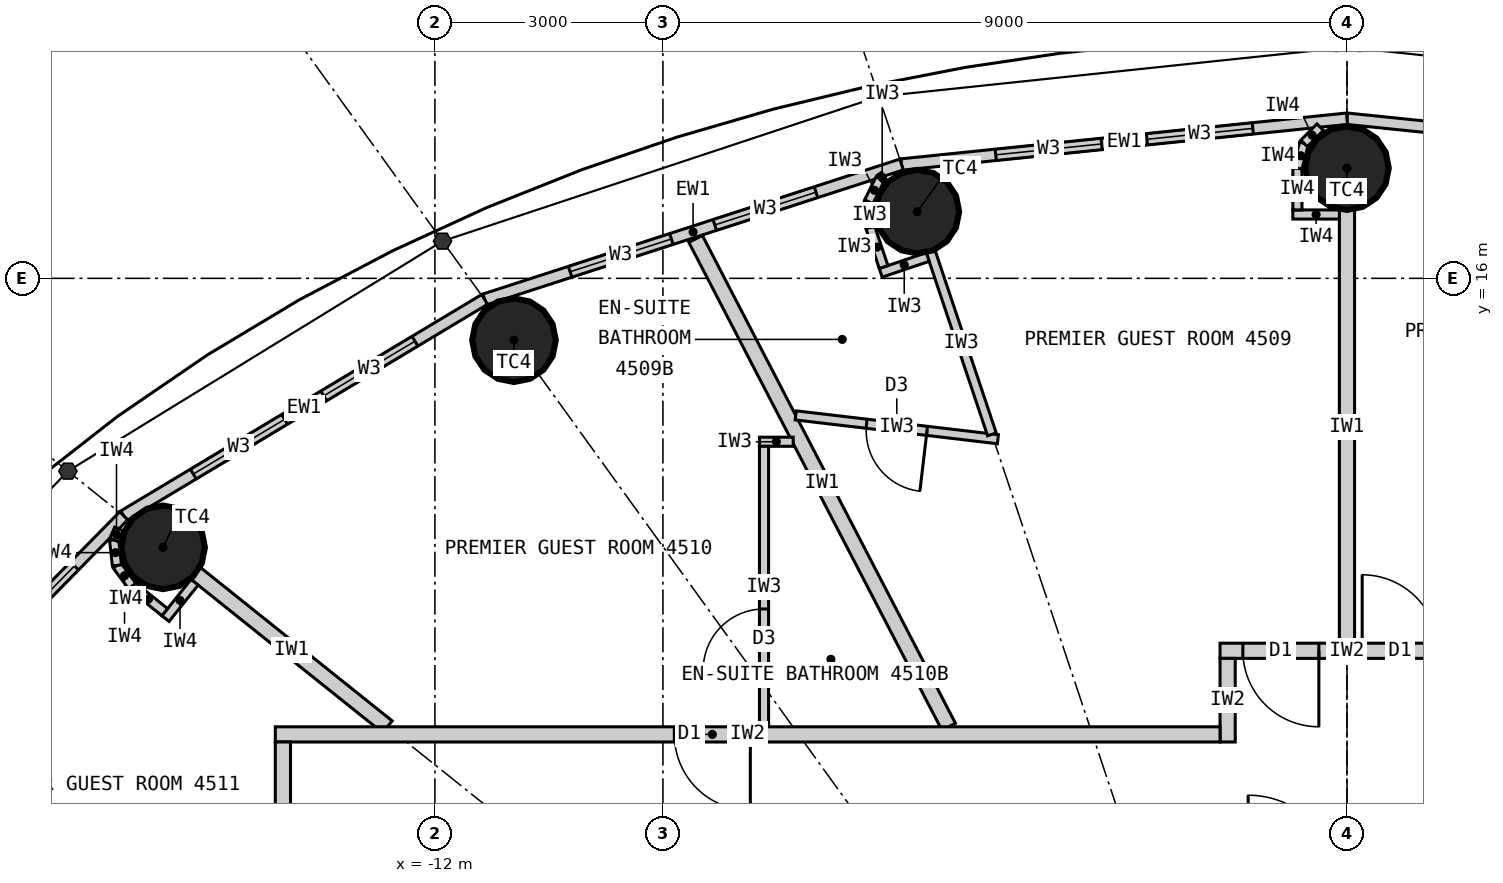
"""IFC4 building model, lengths in metres.
Left out: names, types, materials, properties, quantities, classifications, styles, units other than length and angle.
Written with IfcOpenShell. Run it as: python <this file> out.ifc"""

import sys

from ifc_helpers import new_model, si_unit, direction, frame, frame_2d, origin, origin_2d, place, context, subcontext, project, spatial, rectangle, circle, extrude, element, fill, save


model = new_model("IFC4")
c1 = context("Model", 3, precision=1e-05, world=origin(), true_north=direction((0.0, 1.0)))
c2 = subcontext(c1, "Body", "Model", "MODEL_VIEW")
j1 = project(units=[si_unit("LENGTHUNIT", "METRE"), si_unit("PLANEANGLEUNIT", "RADIAN")], contexts=[c1])
p1 = place(None, origin())
s1 = spatial("IfcSite", under=j1, at=p1, CompositionType="ELEMENT")
p2 = place(p1, origin())
s2 = spatial("IfcBuilding", under=s1, at=p2, CompositionType="ELEMENT")
p3 = place(p2, frame((0.0, 0.0, 169.8)))
s3 = spatial("IfcBuildingStorey", under=s2, at=p3, CompositionType="ELEMENT", Elevation=169.8)
for number, where, z_axis, x_axis in (
    (1, (0.0, 17.45, 0.0), (0.0, 0.0, 1.0), (1.0, 0.0, 0.0)),
    (2, (-5.653, 16.877, 0.0), (0.0, 0.0, 1.0), (1.0, 0.0, 0.0)),
    (3, (-10.96, 15.186, 0.0), (0.0, 0.0, 1.0), (1.0, 0.0, 0.0)),
    (4, (-15.576, 12.461, 0.0), (0.0, 0.0, 1.0), (1.0, 0.0, 0.0)),
):
    element("IfcColumn", number, at=place(p3, frame(where, z_axis=z_axis, x_axis=x_axis)), inside=s3, PredefinedType="COLUMN", context=c2, shape_type="SweptSolid", body=[
        extrude(circle(Radius=0.55, at=origin_2d()), origin(), (0.0, 0.0, 1.0), 3.3),
    ])
p4 = place(p3, frame((5.86, 17.497, 0.0), z_axis=(0.0, 0.0, 1.0), x_axis=(-0.994751738032, 0.102318032045, 0.0)))
e5 = element("IfcWall", 5, at=p4, inside=s3, PredefinedType="ELEMENTEDWALL", context=c2, shape_type="SweptSolid", body=[
    extrude(rectangle(XDim=5.891, YDim=0.15, at=frame_2d((2.946, 0.0))), origin(), (0.0, 0.0, 1.0), 3.12),
])
p5 = place(p4, frame((1.246, 0.0, 0.9)))
e6 = element("IfcOpeningElement", 6, at=p5, cuts=e5, PredefinedType="OPENING", context=c2, shape_type="SweptSolid", body=[
    extrude(rectangle(XDim=1.4, YDim=1.9, at=frame_2d((0.7, 0.95))), frame((0.0, 0.085, 0.0), z_axis=(0.0, -1.0, 0.0), x_axis=(1.0, 0.0, 0.0)), (0.0, 0.0, 1.0), 0.17),
])
p6 = place(p4, frame((3.246, 0.0, 0.9)))
e7 = element("IfcOpeningElement", 7, at=p6, cuts=e5, PredefinedType="OPENING", context=c2, shape_type="SweptSolid", body=[
    extrude(rectangle(XDim=1.4, YDim=1.9, at=frame_2d((0.7, 0.95))), frame((0.0, 0.085, 0.0), z_axis=(0.0, -1.0, 0.0), x_axis=(1.0, 0.0, 0.0)), (0.0, 0.0, 1.0), 0.17),
])
p7 = place(p3, frame((0.0, 18.1, 0.0), z_axis=(0.0, 0.0, 1.0), x_axis=(-0.994751738032, -0.102318032045, 0.0)))
e8 = element("IfcWall", 8, at=p7, inside=s3, PredefinedType="ELEMENTEDWALL", context=c2, shape_type="SweptSolid", body=[
    extrude(rectangle(XDim=5.891, YDim=0.15, at=frame_2d((2.946, 0.0))), origin(), (0.0, 0.0, 1.0), 3.12),
])
p8 = place(p7, frame((1.246, 0.0, 0.9)))
e9 = element("IfcOpeningElement", 9, at=p8, cuts=e8, PredefinedType="OPENING", context=c2, shape_type="SweptSolid", body=[
    extrude(rectangle(XDim=1.4, YDim=1.9, at=frame_2d((0.7, 0.95))), frame((0.0, 0.085, 0.0), z_axis=(0.0, -1.0, 0.0), x_axis=(1.0, 0.0, 0.0)), (0.0, 0.0, 1.0), 0.17),
])
p9 = place(p7, frame((3.246, 0.0, 0.9)))
e10 = element("IfcOpeningElement", 10, at=p9, cuts=e8, PredefinedType="OPENING", context=c2, shape_type="SweptSolid", body=[
    extrude(rectangle(XDim=1.4, YDim=1.9, at=frame_2d((0.7, 0.95))), frame((0.0, 0.085, 0.0), z_axis=(0.0, -1.0, 0.0), x_axis=(1.0, 0.0, 0.0)), (0.0, 0.0, 1.0), 0.17),
])
p10 = place(p3, frame((-5.86, 17.497, 0.0), z_axis=(0.0, 0.0, 1.0), x_axis=(-0.951432482129, -0.307857486429, 0.0)))
e11 = element("IfcWall", 11, at=p10, inside=s3, PredefinedType="ELEMENTEDWALL", context=c2, shape_type="SweptSolid", body=[
    extrude(rectangle(XDim=5.766, YDim=0.15, at=frame_2d((2.883, 0.0))), origin(), (0.0, 0.0, 1.0), 3.12),
])
p11 = place(p10, frame((1.183, 0.0, 0.9)))
e12 = element("IfcOpeningElement", 12, at=p11, cuts=e11, PredefinedType="OPENING", context=c2, shape_type="SweptSolid", body=[
    extrude(rectangle(XDim=1.4, YDim=1.9, at=frame_2d((0.7, 0.95))), frame((0.0, 0.085, 0.0), z_axis=(0.0, -1.0, 0.0), x_axis=(1.0, 0.0, 0.0)), (0.0, 0.0, 1.0), 0.17),
])
p12 = place(p10, frame((3.183, 0.0, 0.9)))
e13 = element("IfcOpeningElement", 13, at=p12, cuts=e11, PredefinedType="OPENING", context=c2, shape_type="SweptSolid", body=[
    extrude(rectangle(XDim=1.4, YDim=1.9, at=frame_2d((0.7, 0.95))), frame((0.0, 0.085, 0.0), z_axis=(0.0, -1.0, 0.0), x_axis=(1.0, 0.0, 0.0)), (0.0, 0.0, 1.0), 0.17),
])
p13 = place(p3, frame((-11.346, 15.722, 0.0), z_axis=(0.0, 0.0, 1.0), x_axis=(-0.857695199231, -0.514158482587, 0.0)))
e14 = element("IfcWall", 14, at=p13, inside=s3, PredefinedType="ELEMENTEDWALL", context=c2, shape_type="SweptSolid", body=[
    extrude(rectangle(XDim=5.536, YDim=0.15, at=frame_2d((2.768, 0.0))), origin(), (0.0, 0.0, 1.0), 3.12),
])
p14 = place(p13, frame((1.068, 0.0, 0.9)))
e15 = element("IfcOpeningElement", 15, at=p14, cuts=e14, PredefinedType="OPENING", context=c2, shape_type="SweptSolid", body=[
    extrude(rectangle(XDim=1.4, YDim=1.9, at=frame_2d((0.7, 0.95))), frame((0.0, 0.085, 0.0), z_axis=(0.0, -1.0, 0.0), x_axis=(1.0, 0.0, 0.0)), (0.0, 0.0, 1.0), 0.17),
])
p15 = place(p13, frame((3.068, 0.0, 0.9)))
e16 = element("IfcOpeningElement", 16, at=p15, cuts=e14, PredefinedType="OPENING", context=c2, shape_type="SweptSolid", body=[
    extrude(rectangle(XDim=1.4, YDim=1.9, at=frame_2d((0.7, 0.95))), frame((0.0, 0.085, 0.0), z_axis=(0.0, -1.0, 0.0), x_axis=(1.0, 0.0, 0.0)), (0.0, 0.0, 1.0), 0.17),
])
p16 = place(p3, frame((-16.095, 12.876, 0.0), z_axis=(0.0, 0.0, 1.0), x_axis=(-0.700727467776, -0.71342905457, 0.0)))
e17 = element("IfcWall", 17, at=p16, inside=s3, PredefinedType="ELEMENTEDWALL", context=c2, shape_type="SweptSolid", body=[
    extrude(rectangle(XDim=5.247, YDim=0.15, at=frame_2d((2.624, 0.0))), origin(), (0.0, 0.0, 1.0), 3.12),
])
p17 = place(p16, frame((0.924, 0.0, 0.9)))
e18 = element("IfcOpeningElement", 18, at=p17, cuts=e17, PredefinedType="OPENING", context=c2, shape_type="SweptSolid", body=[
    extrude(rectangle(XDim=1.4, YDim=1.9, at=frame_2d((0.7, 0.95))), frame((0.0, 0.085, 0.0), z_axis=(0.0, -1.0, 0.0), x_axis=(1.0, 0.0, 0.0)), (0.0, 0.0, 1.0), 0.17),
])
p18 = place(p16, frame((2.924, 0.0, 0.9)))
e19 = element("IfcOpeningElement", 19, at=p18, cuts=e17, PredefinedType="OPENING", context=c2, shape_type="SweptSolid", body=[
    extrude(rectangle(XDim=1.4, YDim=1.9, at=frame_2d((0.7, 0.95))), frame((0.0, 0.085, 0.0), z_axis=(0.0, -1.0, 0.0), x_axis=(1.0, 0.0, 0.0)), (0.0, 0.0, 1.0), 0.17),
])
p19 = place(p3, frame((0.0, 11.2, 0.0), z_axis=(0.0, 0.0, 1.0), x_axis=(0.0, 1.0, 0.0)))
e20 = element("IfcWall", 20, at=p19, inside=s3, PredefinedType="PARTITIONING", context=c2, shape_type="SweptSolid", body=[
    extrude(rectangle(XDim=5.7, YDim=0.2, at=frame_2d((2.85, 0.0))), origin(), (0.0, 0.0, 1.0), 2.42),
])
p20 = place(p3, frame((-5.24, 10.1, 0.0), z_axis=(0.0, 0.0, 1.0), x_axis=(-0.460532965373, 0.887642601391, 0.0)))
e21 = element("IfcWall", 21, at=p20, inside=s3, PredefinedType="PARTITIONING", context=c2, shape_type="SweptSolid", body=[
    extrude(rectangle(XDim=7.231, YDim=0.2, at=frame_2d((3.616, 0.0))), origin(), (0.0, 0.0, 1.0), 3.12),
])
p21 = place(p3, frame((-12.625, 10.1, 0.0), z_axis=(0.0, 0.0, 1.0), x_axis=(-0.780876185034, 0.624685827954, 0.0)))
e22 = element("IfcWall", 22, at=p21, inside=s3, PredefinedType="PARTITIONING", context=c2, shape_type="SweptSolid", body=[
    extrude(rectangle(XDim=3.229, YDim=0.2, at=frame_2d((1.615, 0.0))), origin(), (0.0, 0.0, 1.0), 2.42),
])
p22 = place(p3, frame((-1.67, 11.1, 0.0), z_axis=(0.0, 0.0, 1.0), x_axis=(1.0, 0.0, 0.0)))
e23 = element("IfcWall", 23, at=p22, inside=s3, PredefinedType="PARTITIONING", context=c2, shape_type="SweptSolid", body=[
    extrude(rectangle(XDim=3.34, YDim=0.2, at=frame_2d((1.67, 0.0))), origin(), (0.0, 0.0, 1.0), 3.12),
])
p23 = place(p22, frame((1.87, 0.0, 0.0)))
e24 = element("IfcOpeningElement", 24, at=p23, cuts=e23, PredefinedType="OPENING", context=c2, shape_type="SweptSolid", body=[
    extrude(rectangle(XDim=1.0, YDim=2.2, at=frame_2d((0.5, 1.1))), frame((0.0, 0.11, 0.0), z_axis=(0.0, -1.0, 0.0), x_axis=(1.0, 0.0, 0.0)), (0.0, 0.0, 1.0), 0.22),
])
p24 = place(p22, frame((0.3, 0.0, 0.0)))
e25 = element("IfcOpeningElement", 25, at=p24, cuts=e23, PredefinedType="OPENING", context=c2, shape_type="SweptSolid", body=[
    extrude(rectangle(XDim=1.0, YDim=2.2, at=frame_2d((0.5, 1.1))), frame((0.0, 0.11, 0.0), z_axis=(0.0, -1.0, 0.0), x_axis=(1.0, 0.0, 0.0)), (0.0, 0.0, 1.0), 0.22),
])
p25 = place(p3, frame((-1.57, 9.9, 0.0), z_axis=(0.0, 0.0, 1.0), x_axis=(0.0, 1.0, 0.0)))
e26 = element("IfcWall", 26, at=p25, inside=s3, PredefinedType="PARTITIONING", context=c2, shape_type="SweptSolid", body=[
    extrude(rectangle(XDim=1.1, YDim=0.2, at=frame_2d((0.55, 0.0))), origin(), (0.0, 0.0, 1.0), 3.12),
])
p26 = place(p3, frame((-7.253, 14.197, 0.0), z_axis=(0.0, 0.0, 1.0), x_axis=(0.993128188393, -0.117031625725, 0.0)))
e27 = element("IfcWall", 27, at=p26, inside=s3, PredefinedType="PARTITIONING", context=c2, shape_type="SweptSolid", body=[
    extrude(rectangle(XDim=2.678, YDim=0.12, at=frame_2d((1.339, 0.0))), origin(), (0.0, 0.0, 1.0), 3.12),
])
p27 = place(p26, frame((0.939, 0.0, 0.0)))
e28 = element("IfcOpeningElement", 28, at=p27, cuts=e27, PredefinedType="OPENING", context=c2, shape_type="SweptSolid", body=[
    extrude(rectangle(XDim=0.8, YDim=2.1, at=frame_2d((0.4, 1.05))), frame((0.0, 0.07, 0.0), z_axis=(0.0, -1.0, 0.0), x_axis=(1.0, 0.0, 0.0)), (0.0, 0.0, 1.0), 0.14),
])
p28 = place(p3, frame((-4.671, 13.948, 0.0), z_axis=(0.0, 0.0, 1.0), x_axis=(-0.317669167093, 0.948201613729, 0.0)))
e29 = element("IfcWall", 29, at=p28, inside=s3, PredefinedType="PARTITIONING", context=c2, shape_type="SweptSolid", body=[
    extrude(rectangle(XDim=2.54, YDim=0.12, at=frame_2d((1.27, 0.0))), origin(), (0.0, 0.0, 1.0), 2.42),
])
p29 = place(p3, frame((-5.516, 16.28, 0.0), z_axis=(0.0, 0.0, 1.0), x_axis=(-0.948157944392, -0.317799484717, 0.0)))
e30 = element("IfcWall", 30, at=p29, inside=s3, PredefinedType="PARTITIONING", context=c2, shape_type="SweptSolid", body=[
    extrude(rectangle(XDim=0.652, YDim=0.12, at=frame_2d((0.326, 0.0))), origin(), (0.0, 0.0, 1.0), 3.12),
])
p30 = place(p3, frame((-6.097, 16.149, 0.0), z_axis=(0.0, 0.0, 1.0), x_axis=(-0.317292604854, 0.948327687514, 0.0)))
e31 = element("IfcWall", 31, at=p30, inside=s3, PredefinedType="PARTITIONING", context=c2, shape_type="SweptSolid", body=[
    extrude(rectangle(XDim=0.55, YDim=0.12, at=frame_2d((0.275, 0.0))), origin(), (0.0, 0.0, 1.0), 3.12),
])
for number, where, z_axis, x_axis in (
    (32, (-6.271, 16.67, 0.0), (0.0, 0.0, 1.0), (-0.061, 0.998, 0.0)),
    (33, (-6.292, 17.007, 0.0), (0.0, 0.0, 1.0), (0.445, 0.895, 0.0)),
):
    element("IfcWall", number, at=place(p3, frame(where, z_axis=z_axis, x_axis=x_axis)), inside=s3, PredefinedType="PARTITIONING", context=c2, shape_type="SweptSolid", body=[
        extrude(rectangle(XDim=0.338, YDim=0.12, at=frame_2d((0.169, 0.0))), origin(), (0.0, 0.0, 1.0), 3.12),
    ])
p31 = place(p3, frame((-6.142, 17.31, 0.0), z_axis=(0.0, 0.0, 1.0), x_axis=(0.835039693181, 0.550189704386, 0.0)))
e34 = element("IfcWall", 34, at=p31, inside=s3, PredefinedType="PARTITIONING", context=c2, shape_type="SweptSolid", body=[
    extrude(rectangle(XDim=0.062, YDim=0.12, at=frame_2d((0.031, 0.0))), origin(), (0.0, 0.0, 1.0), 3.12),
])
p32 = place(p3, frame((-7.286, 13.85, 0.0), z_axis=(0.0, 0.0, 1.0), x_axis=(-1.0, 0.0, 0.0)))
e35 = element("IfcWall", 35, at=p32, inside=s3, PredefinedType="PARTITIONING", context=c2, shape_type="SweptSolid", body=[
    extrude(rectangle(XDim=0.444, YDim=0.12, at=frame_2d((0.222, 0.0))), origin(), (0.0, 0.0, 1.0), 3.12),
])
p33 = place(p3, frame((-7.67, 10.1, 0.0), z_axis=(0.0, 0.0, 1.0), x_axis=(0.0, 1.0, 0.0)))
e36 = element("IfcWall", 36, at=p33, inside=s3, PredefinedType="PARTITIONING", context=c2, shape_type="SweptSolid", body=[
    extrude(rectangle(XDim=3.69, YDim=0.12, at=frame_2d((1.845, 0.0))), origin(), (0.0, 0.0, 1.0), 3.12),
])
p34 = place(p33, frame((0.75, 0.0, 0.0)))
e37 = element("IfcOpeningElement", 37, at=p34, cuts=e36, PredefinedType="OPENING", context=c2, shape_type="SweptSolid", body=[
    extrude(rectangle(XDim=0.8, YDim=2.1, at=frame_2d((0.4, 1.05))), frame((0.0, 0.07, 0.0), z_axis=(0.0, -1.0, 0.0), x_axis=(1.0, 0.0, 0.0)), (0.0, 0.0, 1.0), 0.14),
])
p35 = place(p3, frame((-14.1, 10.0, 0.0), z_axis=(0.0, 0.0, 1.0), x_axis=(1.0, 0.0, 0.0)))
e38 = element("IfcWall", 38, at=p35, inside=s3, PredefinedType="PARTITIONING", context=c2, shape_type="SweptSolid", body=[
    extrude(rectangle(XDim=12.43, YDim=0.2, at=frame_2d((6.215, 0.0))), origin(), (0.0, 0.0, 1.0), 3.12),
])
p36 = place(p35, frame((5.25, 0.0, 0.0)))
e39 = element("IfcOpeningElement", 39, at=p36, cuts=e38, PredefinedType="OPENING", context=c2, shape_type="SweptSolid", body=[
    extrude(rectangle(XDim=1.0, YDim=2.2, at=frame_2d((0.5, 1.1))), frame((0.0, 0.11, 0.0), z_axis=(0.0, -1.0, 0.0), x_axis=(1.0, 0.0, 0.0)), (0.0, 0.0, 1.0), 0.22),
])
p37 = place(p3, frame((-14.0, 9.9, 0.0), z_axis=(0.0, 0.0, 1.0), x_axis=(0.0, -1.0, 0.0)))
e40 = element("IfcWall", 40, at=p37, inside=s3, PredefinedType="PARTITIONING", context=c2, shape_type="SweptSolid", body=[
    extrude(rectangle(XDim=8.23, YDim=0.2, at=frame_2d((4.115, 0.0))), origin(), (0.0, 0.0, 1.0), 3.12),
])
p38 = place(p37, frame((1.678, 0.0, 0.0)))
e41 = element("IfcOpeningElement", 41, at=p38, cuts=e40, PredefinedType="OPENING", context=c2, shape_type="SweptSolid", body=[
    extrude(rectangle(XDim=1.0, YDim=2.2, at=frame_2d((0.5, 1.1))), frame((0.0, 0.11, 0.0), z_axis=(0.0, -1.0, 0.0), x_axis=(1.0, 0.0, 0.0)), (0.0, 0.0, 1.0), 0.22),
])
p39 = place(p3, frame((-0.1, 16.84, 0.0), z_axis=(0.0, 0.0, 1.0), x_axis=(-1.0, 0.0, 0.0)))
e42 = element("IfcWall", 42, at=p39, inside=s3, PredefinedType="PARTITIONING", context=c2, shape_type="SweptSolid", body=[
    extrude(rectangle(XDim=0.612, YDim=0.12, at=frame_2d((0.306, 0.0))), origin(), (0.0, 0.0, 1.0), 3.12),
])
p40 = place(p3, frame((-0.652, 16.9, 0.0), z_axis=(0.0, 0.0, 1.0), x_axis=(0.0, 1.0, 0.0)))
e43 = element("IfcWall", 43, at=p40, inside=s3, PredefinedType="PARTITIONING", context=c2, shape_type="SweptSolid", body=[
    extrude(rectangle(XDim=0.55, YDim=0.12, at=frame_2d((0.275, 0.0))), origin(), (0.0, 0.0, 1.0), 3.12),
])
p41 = place(p3, frame((-0.652, 17.45, 0.0), z_axis=(0.0, 0.0, 1.0), x_axis=(0.258832454679, 0.965922233104, 0.0)))
e44 = element("IfcWall", 44, at=p41, inside=s3, PredefinedType="PARTITIONING", context=c2, shape_type="SweptSolid", body=[
    extrude(rectangle(XDim=0.338, YDim=0.12, at=frame_2d((0.169, 0.0))), origin(), (0.0, 0.0, 1.0), 3.12),
])
p42 = place(p3, frame((-0.565, 17.776, 0.0), z_axis=(0.0, 0.0, 1.0), x_axis=(0.707106781187, 0.707106781187, 0.0)))
e45 = element("IfcWall", 45, at=p42, inside=s3, PredefinedType="PARTITIONING", context=c2, shape_type="SweptSolid", body=[
    extrude(rectangle(XDim=0.301, YDim=0.12, at=frame_2d((0.15, 0.0))), origin(), (0.0, 0.0, 1.0), 3.12),
])
p43 = place(p3, frame((-15.162, 12.002, 0.0), z_axis=(0.0, 0.0, 1.0), x_axis=(-0.624597762427, -0.780946627607, 0.0)))
e46 = element("IfcWall", 46, at=p43, inside=s3, PredefinedType="PARTITIONING", context=c2, shape_type="SweptSolid", body=[
    extrude(rectangle(XDim=0.612, YDim=0.12, at=frame_2d((0.306, 0.0))), origin(), (0.0, 0.0, 1.0), 3.12),
])
p44 = place(p3, frame((-15.554, 11.608, 0.0), z_axis=(0.0, 0.0, 1.0), x_axis=(-0.780695577787, 0.624911525597, 0.0)))
e47 = element("IfcWall", 47, at=p44, inside=s3, PredefinedType="PARTITIONING", context=c2, shape_type="SweptSolid", body=[
    extrude(rectangle(XDim=0.55, YDim=0.12, at=frame_2d((0.275, 0.0))), origin(), (0.0, 0.0, 1.0), 3.12),
])
p45 = place(p3, frame((-15.984, 11.952, 0.0), z_axis=(0.0, 0.0, 1.0), x_axis=(-0.592335221171, 0.805691619517, 0.0)))
e48 = element("IfcWall", 48, at=p45, inside=s3, PredefinedType="PARTITIONING", context=c2, shape_type="SweptSolid", body=[
    extrude(rectangle(XDim=0.338, YDim=0.12, at=frame_2d((0.169, 0.0))), origin(), (0.0, 0.0, 1.0), 3.12),
])
p46 = place(p3, frame((-16.184, 12.224, 0.0), z_axis=(0.0, 0.0, 1.0), x_axis=(-0.110669692975, 0.993857242795, 0.0)))
e49 = element("IfcWall", 49, at=p46, inside=s3, PredefinedType="PARTITIONING", context=c2, shape_type="SweptSolid", body=[
    extrude(rectangle(XDim=0.337, YDim=0.12, at=frame_2d((0.169, 0.0))), origin(), (0.0, 0.0, 1.0), 3.12),
])
p47 = place(p3, frame((-16.221, 12.559, 0.0), z_axis=(0.0, 0.0, 1.0), x_axis=(0.401064416249, 0.916049853457, 0.0)))
e50 = element("IfcWall", 50, at=p47, inside=s3, PredefinedType="PARTITIONING", context=c2, shape_type="SweptSolid", body=[
    extrude(rectangle(XDim=0.156, YDim=0.12, at=frame_2d((0.078, 0.0))), origin(), (0.0, 0.0, 1.0), 3.12),
])
p48 = place(p8, origin())
e51 = element("IfcWindow", 51, at=p48, inside=s3, PartitioningType="SINGLE_PANEL", PredefinedType="WINDOW", context=c2, shape_type="SweptSolid", body=[
    extrude(rectangle(XDim=1.4, YDim=1.9, at=frame_2d((0.7, 0.95))), frame((0.0, 0.03, 0.0), z_axis=(0.0, -1.0, 0.0), x_axis=(1.0, 0.0, 0.0)), (0.0, 0.0, 1.0), 0.06),
])
fill(e9, e51)
p49 = place(p9, origin())
e52 = element("IfcWindow", 52, at=p49, inside=s3, PartitioningType="SINGLE_PANEL", PredefinedType="WINDOW", context=c2, shape_type="SweptSolid", body=[
    extrude(rectangle(XDim=1.4, YDim=1.9, at=frame_2d((0.7, 0.95))), frame((0.0, 0.03, 0.0), z_axis=(0.0, -1.0, 0.0), x_axis=(1.0, 0.0, 0.0)), (0.0, 0.0, 1.0), 0.06),
])
fill(e10, e52)
p50 = place(p11, origin())
e53 = element("IfcWindow", 53, at=p50, inside=s3, PartitioningType="SINGLE_PANEL", PredefinedType="WINDOW", context=c2, shape_type="SweptSolid", body=[
    extrude(rectangle(XDim=1.4, YDim=1.9, at=frame_2d((0.7, 0.95))), frame((0.0, 0.03, 0.0), z_axis=(0.0, -1.0, 0.0), x_axis=(1.0, 0.0, 0.0)), (0.0, 0.0, 1.0), 0.06),
])
fill(e12, e53)
p51 = place(p12, origin())
e54 = element("IfcWindow", 54, at=p51, inside=s3, PartitioningType="SINGLE_PANEL", PredefinedType="WINDOW", context=c2, shape_type="SweptSolid", body=[
    extrude(rectangle(XDim=1.4, YDim=1.9, at=frame_2d((0.7, 0.95))), frame((0.0, 0.03, 0.0), z_axis=(0.0, -1.0, 0.0), x_axis=(1.0, 0.0, 0.0)), (0.0, 0.0, 1.0), 0.06),
])
fill(e13, e54)
p52 = place(p14, origin())
e55 = element("IfcWindow", 55, at=p52, inside=s3, PartitioningType="SINGLE_PANEL", PredefinedType="WINDOW", context=c2, shape_type="SweptSolid", body=[
    extrude(rectangle(XDim=1.4, YDim=1.9, at=frame_2d((0.7, 0.95))), frame((0.0, 0.03, 0.0), z_axis=(0.0, -1.0, 0.0), x_axis=(1.0, 0.0, 0.0)), (0.0, 0.0, 1.0), 0.06),
])
fill(e15, e55)
p53 = place(p15, origin())
e56 = element("IfcWindow", 56, at=p53, inside=s3, PartitioningType="SINGLE_PANEL", PredefinedType="WINDOW", context=c2, shape_type="SweptSolid", body=[
    extrude(rectangle(XDim=1.4, YDim=1.9, at=frame_2d((0.7, 0.95))), frame((0.0, 0.03, 0.0), z_axis=(0.0, -1.0, 0.0), x_axis=(1.0, 0.0, 0.0)), (0.0, 0.0, 1.0), 0.06),
])
fill(e16, e56)
p54 = place(p17, origin())
e57 = element("IfcWindow", 57, at=p54, inside=s3, PartitioningType="SINGLE_PANEL", PredefinedType="WINDOW", context=c2, shape_type="SweptSolid", body=[
    extrude(rectangle(XDim=1.4, YDim=1.9, at=frame_2d((0.7, 0.95))), frame((0.0, 0.03, 0.0), z_axis=(0.0, -1.0, 0.0), x_axis=(1.0, 0.0, 0.0)), (0.0, 0.0, 1.0), 0.06),
])
fill(e18, e57)
p55 = place(p23, origin())
e58 = element("IfcDoor", 58, at=p55, inside=s3, OperationType="SINGLE_SWING_LEFT", PredefinedType="DOOR", context=c2, shape_type="SweptSolid", body=[
    extrude(rectangle(XDim=1.0, YDim=2.2, at=frame_2d((0.5, 1.1))), frame((0.0, 0.025, 0.0), z_axis=(0.0, -1.0, 0.0), x_axis=(1.0, 0.0, 0.0)), (0.0, 0.0, 1.0), 0.05),
])
fill(e24, e58)
p56 = place(p27, origin())
e59 = element("IfcDoor", 59, at=p56, inside=s3, OperationType="SINGLE_SWING_RIGHT", PredefinedType="DOOR", context=c2, shape_type="SweptSolid", body=[
    extrude(rectangle(XDim=0.8, YDim=2.1, at=frame_2d((0.4, 1.05))), frame((0.0, 0.025, 0.0), z_axis=(0.0, -1.0, 0.0), x_axis=(1.0, 0.0, 0.0)), (0.0, 0.0, 1.0), 0.05),
])
fill(e28, e59)
p57 = place(p24, origin())
e60 = element("IfcDoor", 60, at=p57, inside=s3, OperationType="SINGLE_SWING_RIGHT", PredefinedType="DOOR", context=c2, shape_type="SweptSolid", body=[
    extrude(rectangle(XDim=1.0, YDim=2.2, at=frame_2d((0.5, 1.1))), frame((0.0, 0.025, 0.0), z_axis=(0.0, -1.0, 0.0), x_axis=(1.0, 0.0, 0.0)), (0.0, 0.0, 1.0), 0.05),
])
fill(e25, e60)
p58 = place(p34, origin())
e61 = element("IfcDoor", 61, at=p58, inside=s3, OperationType="SINGLE_SWING_LEFT", PredefinedType="DOOR", context=c2, shape_type="SweptSolid", body=[
    extrude(rectangle(XDim=0.8, YDim=2.1, at=frame_2d((0.4, 1.05))), frame((0.0, 0.025, 0.0), z_axis=(0.0, -1.0, 0.0), x_axis=(1.0, 0.0, 0.0)), (0.0, 0.0, 1.0), 0.05),
])
fill(e37, e61)
p59 = place(p36, origin())
e62 = element("IfcDoor", 62, at=p59, inside=s3, OperationType="SINGLE_SWING_RIGHT", PredefinedType="DOOR", context=c2, shape_type="SweptSolid", body=[
    extrude(rectangle(XDim=1.0, YDim=2.2, at=frame_2d((0.5, 1.1))), frame((0.0, 0.025, 0.0), z_axis=(0.0, -1.0, 0.0), x_axis=(1.0, 0.0, 0.0)), (0.0, 0.0, 1.0), 0.05),
])
fill(e39, e62)
save(model, sys.argv[1])
